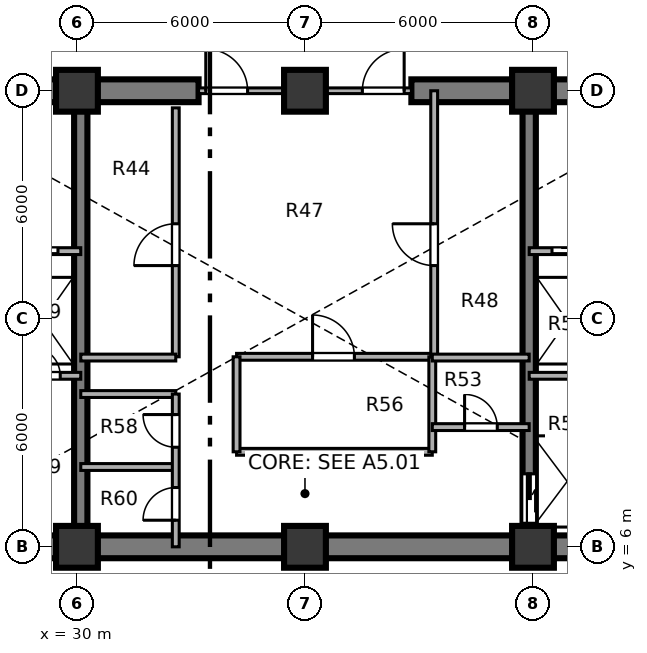
"""IFC4 building model, lengths in metres.
Left out: names, types, materials, properties, quantities, classifications, styles, units other than length and angle.
Written with IfcOpenShell. Run it as: python <this file> out.ifc"""

import sys

from ifc_helpers import new_model, si_unit, direction, frame, frame_2d, origin, origin_2d, place, context, subcontext, project, spatial, rectangle, extrude, source, transform, mapped, element, fill, save


model = new_model("IFC4")
c1 = context("Model", 3, precision=1e-05, world=origin(), true_north=direction((0.0, 1.0)))
c2 = subcontext(c1, "Body", "Model", "MODEL_VIEW")
j1 = project(units=[si_unit("LENGTHUNIT", "METRE"), si_unit("PLANEANGLEUNIT", "RADIAN")], contexts=[c1])
p1 = place(None, origin())
s1 = spatial("IfcSite", under=j1, at=p1, CompositionType="ELEMENT")
p2 = place(p1, origin())
s2 = spatial("IfcBuilding", under=s1, at=p2, CompositionType="ELEMENT")
p3 = place(p2, frame((0.0, 0.0, -4.86)))
s3 = spatial("IfcBuildingStorey", under=s2, at=p3, CompositionType="ELEMENT", Elevation=-4.86)
m1 = source(origin(), c2, "Body", "SweptSolid", [
    extrude(rectangle(XDim=1.1, YDim=1.1, at=origin_2d()), origin(), (0.0, 0.0, 1.0), 4.86),
])
for number, where, z_axis, x_axis in (
    (1, (30.0, 6.0, 0.0), (0.0, 0.0, 1.0), (1.0, 0.0, 0.0)),
    (2, (36.0, 6.0, 0.0), (0.0, 0.0, 1.0), (1.0, 0.0, 0.0)),
    (3, (42.0, 6.0, 0.0), (0.0, 0.0, 1.0), (1.0, 0.0, 0.0)),
    (4, (30.0, 18.0, 0.0), (0.0, 0.0, 1.0), (1.0, 0.0, 0.0)),
    (5, (36.0, 18.0, 0.0), (0.0, 0.0, 1.0), (1.0, 0.0, 0.0)),
    (6, (42.0, 18.0, 0.0), (0.0, 0.0, 1.0), (1.0, 0.0, 0.0)),
):
    element("IfcColumn", number, at=place(p3, frame(where, z_axis=z_axis, x_axis=x_axis)), inside=s3, PredefinedType="COLUMN", context=c2, shape_type="MappedRepresentation", body=[
        mapped(m1, transform((0.0, 0.0, 0.0), x_axis=(1.0, 0.0, 0.0), y_axis=(0.0, 1.0, 0.0), z_axis=(0.0, 0.0, 1.0), scale=1.0)),
    ])
p4 = place(p3, frame((48.3, 6.0, 0.0), z_axis=(0.0, 0.0, 1.0), x_axis=(-1.0, 0.0, 0.0)))
e7 = element("IfcWall", 7, at=p4, inside=s3, PredefinedType="SHEAR", context=c2, shape_type="SweptSolid", body=[
    extrude(rectangle(XDim=24.6, YDim=0.6, at=frame_2d((12.3, 0.0))), origin(), (0.0, 0.0, 1.0), 4.86),
])
p5 = place(p3, frame((23.7, 18.0, 0.0), z_axis=(0.0, 0.0, 1.0), x_axis=(1.0, 0.0, 0.0)))
e8 = element("IfcWall", 8, at=p5, inside=s3, PredefinedType="SHEAR", context=c2, shape_type="SweptSolid", body=[
    extrude(rectangle(XDim=9.5, YDim=0.6, at=frame_2d((4.75, 0.0))), origin(), (0.0, 0.0, 1.0), 4.86),
])
p6 = place(p5, frame((2.95, 0.0, 0.0)))
e9 = element("IfcOpeningElement", 9, at=p6, cuts=e8, PredefinedType="OPENING", context=c2, shape_type="SweptSolid", body=[
    extrude(rectangle(XDim=1.1, YDim=2.1, at=origin_2d()), frame((0.55, 0.31, 1.05), z_axis=(0.0, -1.0, 0.0), x_axis=(1.0, 0.0, 0.0)), (0.0, 0.0, 1.0), 0.62),
])
p7 = place(p3, frame((38.8, 18.0, 0.0), z_axis=(0.0, 0.0, 1.0), x_axis=(1.0, 0.0, 0.0)))
e10 = element("IfcWall", 10, at=p7, inside=s3, PredefinedType="SHEAR", context=c2, shape_type="SweptSolid", body=[
    extrude(rectangle(XDim=9.5, YDim=0.6, at=frame_2d((4.75, 0.0))), origin(), (0.0, 0.0, 1.0), 4.86),
])
p8 = place(p7, frame((5.45, 0.0, 0.0)))
e11 = element("IfcOpeningElement", 11, at=p8, cuts=e10, PredefinedType="OPENING", context=c2, shape_type="SweptSolid", body=[
    extrude(rectangle(XDim=1.1, YDim=2.1, at=origin_2d()), frame((0.55, 0.31, 1.05), z_axis=(0.0, -1.0, 0.0), x_axis=(1.0, 0.0, 0.0)), (0.0, 0.0, 1.0), 0.62),
])
p9 = place(p3, frame((30.1, 6.0, 0.0), z_axis=(0.0, 0.0, 1.0), x_axis=(0.0, 1.0, 0.0)))
e12 = element("IfcWall", 12, at=p9, inside=s3, PredefinedType="SHEAR", context=c2, shape_type="SweptSolid", body=[
    extrude(rectangle(XDim=12.0, YDim=0.35, at=frame_2d((6.0, 0.0))), origin(), (0.0, 0.0, 1.0), 4.86),
])
p10 = place(p3, frame((41.9, 18.0, 0.0), z_axis=(0.0, 0.0, 1.0), x_axis=(0.0, -1.0, 0.0)))
e13 = element("IfcWall", 13, at=p10, inside=s3, PredefinedType="SHEAR", context=c2, shape_type="SweptSolid", body=[
    extrude(rectangle(XDim=12.0, YDim=0.35, at=frame_2d((6.0, 0.0))), origin(), (0.0, 0.0, 1.0), 4.86),
])
p11 = place(p10, frame((10.08, 0.0, 0.0)))
e14 = element("IfcOpeningElement", 14, at=p11, cuts=e13, PredefinedType="OPENING", context=c2, shape_type="SweptSolid", body=[
    extrude(rectangle(XDim=1.3, YDim=2.1, at=origin_2d()), frame((0.65, 0.185, 1.05), z_axis=(0.0, -1.0, 0.0), x_axis=(1.0, 0.0, 0.0)), (0.0, 0.0, 1.0), 0.37),
])
p12 = place(p3, frame((32.6, 11.0, 0.0), z_axis=(0.0, 0.0, 1.0), x_axis=(0.0, 1.0, 0.0)))
e15 = element("IfcWall", 15, at=p12, inside=s3, PredefinedType="PARTITIONING", context=c2, shape_type="SweptSolid", body=[
    extrude(rectangle(XDim=6.55, YDim=0.18, at=frame_2d((3.275, 0.0))), origin(), (0.0, 0.0, 1.0), 4.51),
])
p13 = place(p12, frame((2.4, 0.0, 0.0)))
e16 = element("IfcOpeningElement", 16, at=p13, cuts=e15, PredefinedType="OPENING", context=c2, shape_type="SweptSolid", body=[
    extrude(rectangle(XDim=1.1, YDim=2.1, at=origin_2d()), frame((0.55, 0.1, 1.05), z_axis=(0.0, -1.0, 0.0), x_axis=(1.0, 0.0, 0.0)), (0.0, 0.0, 1.0), 0.2),
])
p14 = place(p3, frame((34.2, 11.0, 0.0), z_axis=(0.0, 0.0, 1.0), x_axis=(1.0, 0.0, 0.0)))
e17 = element("IfcWall", 17, at=p14, inside=s3, PredefinedType="PARTITIONING", context=c2, shape_type="SweptSolid", body=[
    extrude(rectangle(XDim=5.15, YDim=0.18, at=frame_2d((2.575, 0.0))), origin(), (0.0, 0.0, 1.0), 4.51),
])
p15 = place(p14, frame((2.0, 0.0, 0.0)))
e18 = element("IfcOpeningElement", 18, at=p15, cuts=e17, PredefinedType="OPENING", context=c2, shape_type="SweptSolid", body=[
    extrude(rectangle(XDim=1.1, YDim=2.1, at=origin_2d()), frame((0.55, 0.1, 1.05), z_axis=(0.0, -1.0, 0.0), x_axis=(1.0, 0.0, 0.0)), (0.0, 0.0, 1.0), 0.2),
])
p16 = place(p3, frame((34.2, 8.5, 0.0), z_axis=(0.0, 0.0, 1.0), x_axis=(1.0, 0.0, 0.0)))
e19 = element("IfcWall", 19, at=p16, inside=s3, PredefinedType="PARTITIONING", context=c2, shape_type="SweptSolid", body=[
    extrude(rectangle(XDim=5.15, YDim=0.18, at=frame_2d((2.575, 0.0))), origin(), (0.0, 0.0, 1.0), 4.51),
])
for number, where, z_axis, x_axis in (
    (20, (34.2, 8.5, 0.0), (0.0, 0.0, 1.0), (0.0, 1.0, 0.0)),
    (21, (39.35, 8.5, 0.0), (0.0, 0.0, 1.0), (0.0, 1.0, 0.0)),
):
    element("IfcWall", number, at=place(p3, frame(where, z_axis=z_axis, x_axis=x_axis)), inside=s3, PredefinedType="PARTITIONING", context=c2, shape_type="SweptSolid", body=[
        extrude(rectangle(XDim=2.5, YDim=0.18, at=frame_2d((1.25, 0.0))), origin(), (0.0, 0.0, 1.0), 4.51),
    ])
p17 = place(p3, frame((39.4, 11.0, 0.0), z_axis=(0.0, 0.0, 1.0), x_axis=(0.0, 1.0, 0.0)))
e22 = element("IfcWall", 22, at=p17, inside=s3, PredefinedType="PARTITIONING", context=c2, shape_type="SweptSolid", body=[
    extrude(rectangle(XDim=7.0, YDim=0.18, at=frame_2d((3.5, 0.0))), origin(), (0.0, 0.0, 1.0), 4.51),
])
p18 = place(p17, frame((2.4, 0.0, 0.0)))
e23 = element("IfcOpeningElement", 23, at=p18, cuts=e22, PredefinedType="OPENING", context=c2, shape_type="SweptSolid", body=[
    extrude(rectangle(XDim=1.1, YDim=2.1, at=origin_2d()), frame((0.55, 0.1, 1.05), z_axis=(0.0, -1.0, 0.0), x_axis=(1.0, 0.0, 0.0)), (0.0, 0.0, 1.0), 0.2),
])
p19 = place(p3, frame((30.1, 10.98, 0.0), z_axis=(0.0, 0.0, 1.0), x_axis=(1.0, 0.0, 0.0)))
e24 = element("IfcWall", 24, at=p19, inside=s3, PredefinedType="PARTITIONING", context=c2, shape_type="SweptSolid", body=[
    extrude(rectangle(XDim=2.5, YDim=0.18, at=frame_2d((1.25, 0.0))), origin(), (0.0, 0.0, 1.0), 4.51),
])
p20 = place(p3, frame((39.35, 10.98, 0.0), z_axis=(0.0, 0.0, 1.0), x_axis=(1.0, 0.0, 0.0)))
e25 = element("IfcWall", 25, at=p20, inside=s3, PredefinedType="PARTITIONING", context=c2, shape_type="SweptSolid", body=[
    extrude(rectangle(XDim=2.55, YDim=0.18, at=frame_2d((1.275, 0.0))), origin(), (0.0, 0.0, 1.0), 4.51),
])
for number, where, z_axis, x_axis in (
    (26, (30.1, 8.1, 0.0), (0.0, 0.0, 1.0), (1.0, 0.0, 0.0)),
    (27, (30.1, 10.02, 0.0), (0.0, 0.0, 1.0), (1.0, 0.0, 0.0)),
):
    element("IfcWall", number, at=place(p3, frame(where, z_axis=z_axis, x_axis=x_axis)), inside=s3, PredefinedType="PARTITIONING", context=c2, shape_type="SweptSolid", body=[
        extrude(rectangle(XDim=2.5, YDim=0.18, at=frame_2d((1.25, 0.0))), origin(), (0.0, 0.0, 1.0), 4.51),
    ])
p21 = place(p3, frame((32.6, 6.0, 0.0), z_axis=(0.0, 0.0, 1.0), x_axis=(0.0, 1.0, 0.0)))
e28 = element("IfcWall", 28, at=p21, inside=s3, PredefinedType="PARTITIONING", context=c2, shape_type="SweptSolid", body=[
    extrude(rectangle(XDim=4.02, YDim=0.18, at=frame_2d((2.01, 0.0))), origin(), (0.0, 0.0, 1.0), 4.51),
])
p22 = place(p21, frame((0.7, 0.0, 0.0)))
e29 = element("IfcOpeningElement", 29, at=p22, cuts=e28, PredefinedType="OPENING", context=c2, shape_type="SweptSolid", body=[
    extrude(rectangle(XDim=0.86, YDim=2.1, at=origin_2d()), frame((0.43, 0.1, 1.05), z_axis=(0.0, -1.0, 0.0), x_axis=(1.0, 0.0, 0.0)), (0.0, 0.0, 1.0), 0.2),
])
p23 = place(p21, frame((2.62, 0.0, 0.0)))
e30 = element("IfcOpeningElement", 30, at=p23, cuts=e28, PredefinedType="OPENING", context=c2, shape_type="SweptSolid", body=[
    extrude(rectangle(XDim=0.86, YDim=2.1, at=origin_2d()), frame((0.43, 0.1, 1.05), z_axis=(0.0, -1.0, 0.0), x_axis=(1.0, 0.0, 0.0)), (0.0, 0.0, 1.0), 0.2),
])
p24 = place(p3, frame((39.35, 9.15, 0.0), z_axis=(0.0, 0.0, 1.0), x_axis=(1.0, 0.0, 0.0)))
e31 = element("IfcWall", 31, at=p24, inside=s3, PredefinedType="PARTITIONING", context=c2, shape_type="SweptSolid", body=[
    extrude(rectangle(XDim=2.55, YDim=0.18, at=frame_2d((1.275, 0.0))), origin(), (0.0, 0.0, 1.0), 4.51),
])
p25 = place(p24, frame((0.85, 0.0, 0.0)))
e32 = element("IfcOpeningElement", 32, at=p25, cuts=e31, PredefinedType="OPENING", context=c2, shape_type="SweptSolid", body=[
    extrude(rectangle(XDim=0.86, YDim=2.1, at=origin_2d()), frame((0.43, 0.1, 1.05), z_axis=(0.0, -1.0, 0.0), x_axis=(1.0, 0.0, 0.0)), (0.0, 0.0, 1.0), 0.2),
])
p26 = place(p3, frame((33.2, 18.0, 0.0), z_axis=(0.0, 0.0, 1.0), x_axis=(1.0, 0.0, 0.0)))
e33 = element("IfcWall", 33, at=p26, inside=s3, PredefinedType="PARTITIONING", context=c2, shape_type="SweptSolid", body=[
    extrude(rectangle(XDim=5.6, YDim=0.15, at=frame_2d((2.8, 0.0))), origin(), (0.0, 0.0, 1.0), 3.325),
])
p27 = place(p26, frame((0.19, 0.0, 0.0)))
e34 = element("IfcOpeningElement", 34, at=p27, cuts=e33, PredefinedType="OPENING", context=c2, shape_type="SweptSolid", body=[
    extrude(rectangle(XDim=1.1, YDim=2.1, at=origin_2d()), frame((0.55, 0.085, 1.05), z_axis=(0.0, -1.0, 0.0), x_axis=(1.0, 0.0, 0.0)), (0.0, 0.0, 1.0), 0.17),
])
p28 = place(p26, frame((4.31, 0.0, 0.0)))
e35 = element("IfcOpeningElement", 35, at=p28, cuts=e33, PredefinedType="OPENING", context=c2, shape_type="SweptSolid", body=[
    extrude(rectangle(XDim=1.1, YDim=2.1, at=origin_2d()), frame((0.55, 0.085, 1.05), z_axis=(0.0, -1.0, 0.0), x_axis=(1.0, 0.0, 0.0)), (0.0, 0.0, 1.0), 0.17),
])
p29 = place(p3, frame((24.0, 13.78, 0.0), z_axis=(0.0, 0.0, 1.0), x_axis=(1.0, 0.0, 0.0)))
e36 = element("IfcWall", 36, at=p29, inside=s3, PredefinedType="PARTITIONING", context=c2, shape_type="SweptSolid", body=[
    extrude(rectangle(XDim=6.1, YDim=0.18, at=frame_2d((3.05, 0.0))), origin(), (0.0, 0.0, 1.0), 4.51),
])
p30 = place(p29, frame((1.15, 0.0, 0.0)))
e37 = element("IfcOpeningElement", 37, at=p30, cuts=e36, PredefinedType="OPENING", context=c2, shape_type="SweptSolid", body=[
    extrude(rectangle(XDim=1.1, YDim=2.1, at=origin_2d()), frame((0.55, 0.1, 1.05), z_axis=(0.0, -1.0, 0.0), x_axis=(1.0, 0.0, 0.0)), (0.0, 0.0, 1.0), 0.2),
])
p31 = place(p29, frame((4.4, 0.0, 0.0)))
e38 = element("IfcOpeningElement", 38, at=p31, cuts=e36, PredefinedType="OPENING", context=c2, shape_type="SweptSolid", body=[
    extrude(rectangle(XDim=1.1, YDim=2.1, at=origin_2d()), frame((0.55, 0.1, 1.05), z_axis=(0.0, -1.0, 0.0), x_axis=(1.0, 0.0, 0.0)), (0.0, 0.0, 1.0), 0.2),
])
p32 = place(p3, frame((28.15, 10.5, 0.0), z_axis=(0.0, 0.0, 1.0), x_axis=(1.0, 0.0, 0.0)))
e39 = element("IfcWall", 39, at=p32, inside=s3, PredefinedType="PARTITIONING", context=c2, shape_type="SweptSolid", body=[
    extrude(rectangle(XDim=1.95, YDim=0.18, at=frame_2d((0.975, 0.0))), origin(), (0.0, 0.0, 1.0), 4.51),
])
p33 = place(p32, frame((0.65, 0.0, 0.0)))
e40 = element("IfcOpeningElement", 40, at=p33, cuts=e39, PredefinedType="OPENING", context=c2, shape_type="SweptSolid", body=[
    extrude(rectangle(XDim=0.76, YDim=2.05, at=origin_2d()), frame((0.38, 0.1, 1.025), z_axis=(0.0, -1.0, 0.0), x_axis=(1.0, 0.0, 0.0)), (0.0, 0.0, 1.0), 0.2),
])
p34 = place(p3, frame((41.9, 13.78, 0.0), z_axis=(0.0, 0.0, 1.0), x_axis=(1.0, 0.0, 0.0)))
e41 = element("IfcWall", 41, at=p34, inside=s3, PredefinedType="PARTITIONING", context=c2, shape_type="SweptSolid", body=[
    extrude(rectangle(XDim=6.1, YDim=0.18, at=frame_2d((3.05, 0.0))), origin(), (0.0, 0.0, 1.0), 4.51),
])
p35 = place(p34, frame((0.6, 0.0, 0.0)))
e42 = element("IfcOpeningElement", 42, at=p35, cuts=e41, PredefinedType="OPENING", context=c2, shape_type="SweptSolid", body=[
    extrude(rectangle(XDim=1.1, YDim=2.1, at=origin_2d()), frame((0.55, 0.1, 1.05), z_axis=(0.0, -1.0, 0.0), x_axis=(1.0, 0.0, 0.0)), (0.0, 0.0, 1.0), 0.2),
])
p36 = place(p34, frame((3.8, 0.0, 0.0)))
e43 = element("IfcOpeningElement", 43, at=p36, cuts=e41, PredefinedType="OPENING", context=c2, shape_type="SweptSolid", body=[
    extrude(rectangle(XDim=1.1, YDim=2.1, at=origin_2d()), frame((0.55, 0.1, 1.05), z_axis=(0.0, -1.0, 0.0), x_axis=(1.0, 0.0, 0.0)), (0.0, 0.0, 1.0), 0.2),
])
p37 = place(p3, frame((41.9, 10.5, 0.0), z_axis=(0.0, 0.0, 1.0), x_axis=(1.0, 0.0, 0.0)))
e44 = element("IfcWall", 44, at=p37, inside=s3, PredefinedType="PARTITIONING", context=c2, shape_type="SweptSolid", body=[
    extrude(rectangle(XDim=1.95, YDim=0.18, at=frame_2d((0.975, 0.0))), origin(), (0.0, 0.0, 1.0), 4.51),
])
m2 = source(origin(), c2, "Body", "SweptSolid", [
    extrude(rectangle(XDim=1.1, YDim=2.1, at=origin_2d()), frame((0.55, 0.025, 1.05), z_axis=(0.0, -1.0, 0.0), x_axis=(1.0, 0.0, 0.0)), (0.0, 0.0, 1.0), 0.05),
])
p38 = place(p13, origin())
e45 = element("IfcDoor", 45, at=p38, inside=s3, OperationType="SINGLE_SWING_LEFT", PredefinedType="DOOR", context=c2, shape_type="MappedRepresentation", body=[
    mapped(m2, transform((0.0, 0.0, 0.0), x_axis=(1.0, 0.0, 0.0), y_axis=(0.0, 1.0, 0.0), z_axis=(0.0, 0.0, 1.0), scale=1.0)),
])
fill(e16, e45)
p39 = place(p15, origin())
e46 = element("IfcDoor", 46, at=p39, inside=s3, OperationType="SINGLE_SWING_LEFT", PredefinedType="DOOR", context=c2, shape_type="MappedRepresentation", body=[
    mapped(m2, transform((0.0, 0.0, 0.0), x_axis=(1.0, 0.0, 0.0), y_axis=(0.0, 1.0, 0.0), z_axis=(0.0, 0.0, 1.0), scale=1.0)),
])
fill(e18, e46)
p40 = place(p18, origin())
e47 = element("IfcDoor", 47, at=p40, inside=s3, OperationType="SINGLE_SWING_RIGHT", PredefinedType="DOOR", context=c2, shape_type="MappedRepresentation", body=[
    mapped(m2, transform((0.0, 0.0, 0.0), x_axis=(1.0, 0.0, 0.0), y_axis=(0.0, 1.0, 0.0), z_axis=(0.0, 0.0, 1.0), scale=1.0)),
])
fill(e23, e47)
m3 = source(origin(), c2, "Body", "SweptSolid", [
    extrude(rectangle(XDim=0.86, YDim=2.1, at=origin_2d()), frame((0.43, 0.025, 1.05), z_axis=(0.0, -1.0, 0.0), x_axis=(1.0, 0.0, 0.0)), (0.0, 0.0, 1.0), 0.05),
])
p41 = place(p22, origin())
e48 = element("IfcDoor", 48, at=p41, inside=s3, OperationType="SINGLE_SWING_LEFT", PredefinedType="DOOR", context=c2, shape_type="MappedRepresentation", body=[
    mapped(m3, transform((0.0, 0.0, 0.0), x_axis=(1.0, 0.0, 0.0), y_axis=(0.0, 1.0, 0.0), z_axis=(0.0, 0.0, 1.0), scale=1.0)),
])
fill(e29, e48)
p42 = place(p23, origin())
e49 = element("IfcDoor", 49, at=p42, inside=s3, OperationType="SINGLE_SWING_RIGHT", PredefinedType="DOOR", context=c2, shape_type="MappedRepresentation", body=[
    mapped(m3, transform((0.0, 0.0, 0.0), x_axis=(1.0, 0.0, 0.0), y_axis=(0.0, 1.0, 0.0), z_axis=(0.0, 0.0, 1.0), scale=1.0)),
])
fill(e30, e49)
p43 = place(p25, origin())
e50 = element("IfcDoor", 50, at=p43, inside=s3, OperationType="SINGLE_SWING_LEFT", PredefinedType="DOOR", context=c2, shape_type="MappedRepresentation", body=[
    mapped(m3, transform((0.0, 0.0, 0.0), x_axis=(1.0, 0.0, 0.0), y_axis=(0.0, 1.0, 0.0), z_axis=(0.0, 0.0, 1.0), scale=1.0)),
])
fill(e32, e50)
m4 = source(origin(), c2, "Body", "SweptSolid", [
    extrude(rectangle(XDim=1.1, YDim=2.1, at=origin_2d()), frame((0.55, 0.025, 1.05), z_axis=(0.0, -1.0, 0.0), x_axis=(1.0, 0.0, 0.0)), (0.0, 0.0, 1.0), 0.05),
])
p44 = place(p27, origin())
e51 = element("IfcDoor", 51, at=p44, inside=s3, OperationType="SINGLE_SWING_LEFT", PredefinedType="DOOR", context=c2, shape_type="MappedRepresentation", body=[
    mapped(m4, transform((0.0, 0.0, 0.0), x_axis=(1.0, 0.0, 0.0), y_axis=(0.0, 1.0, 0.0), z_axis=(0.0, 0.0, 1.0), scale=1.0)),
])
fill(e34, e51)
p45 = place(p28, origin())
e52 = element("IfcDoor", 52, at=p45, inside=s3, OperationType="SINGLE_SWING_RIGHT", PredefinedType="DOOR", context=c2, shape_type="MappedRepresentation", body=[
    mapped(m4, transform((0.0, 0.0, 0.0), x_axis=(1.0, 0.0, 0.0), y_axis=(0.0, 1.0, 0.0), z_axis=(0.0, 0.0, 1.0), scale=1.0)),
])
fill(e35, e52)
m5 = source(origin(), c2, "Body", "SweptSolid", [
    extrude(rectangle(XDim=1.1, YDim=2.1, at=origin_2d()), frame((0.55, 0.025, 1.05), z_axis=(0.0, -1.0, 0.0), x_axis=(1.0, 0.0, 0.0)), (0.0, 0.0, 1.0), 0.05),
])
p46 = place(p31, origin())
e53 = element("IfcDoor", 53, at=p46, inside=s3, OperationType="SLIDING_TO_LEFT", PredefinedType="DOOR", context=c2, shape_type="MappedRepresentation", body=[
    mapped(m5, transform((0.0, 0.0, 0.0), x_axis=(1.0, 0.0, 0.0), y_axis=(0.0, 1.0, 0.0), z_axis=(0.0, 0.0, 1.0), scale=1.0)),
])
fill(e38, e53)
m6 = source(origin(), c2, "Body", "SweptSolid", [
    extrude(rectangle(XDim=0.76, YDim=2.05, at=origin_2d()), frame((0.38, 0.025, 1.025), z_axis=(0.0, -1.0, 0.0), x_axis=(1.0, 0.0, 0.0)), (0.0, 0.0, 1.0), 0.05),
])
p47 = place(p33, origin())
e54 = element("IfcDoor", 54, at=p47, inside=s3, OperationType="SINGLE_SWING_LEFT", PredefinedType="DOOR", context=c2, shape_type="MappedRepresentation", body=[
    mapped(m6, transform((0.0, 0.0, 0.0), x_axis=(1.0, 0.0, 0.0), y_axis=(0.0, 1.0, 0.0), z_axis=(0.0, 0.0, 1.0), scale=1.0)),
])
fill(e40, e54)
p48 = place(p35, origin())
e55 = element("IfcDoor", 55, at=p48, inside=s3, OperationType="SLIDING_TO_RIGHT", PredefinedType="DOOR", context=c2, shape_type="MappedRepresentation", body=[
    mapped(m5, transform((0.0, 0.0, 0.0), x_axis=(1.0, 0.0, 0.0), y_axis=(0.0, 1.0, 0.0), z_axis=(0.0, 0.0, 1.0), scale=1.0)),
])
fill(e42, e55)
m7 = source(origin(), c2, "Body", "SweptSolid", [
    extrude(rectangle(XDim=1.3, YDim=2.1, at=origin_2d()), frame((0.65, 0.025, 1.05), z_axis=(0.0, -1.0, 0.0), x_axis=(1.0, 0.0, 0.0)), (0.0, 0.0, 1.0), 0.05),
])
p49 = place(p11, origin())
e56 = element("IfcDoor", 56, at=p49, inside=s3, OperationType="SLIDING_TO_LEFT", PredefinedType="DOOR", context=c2, shape_type="MappedRepresentation", body=[
    mapped(m7, transform((0.0, 0.0, 0.0), x_axis=(1.0, 0.0, 0.0), y_axis=(0.0, 1.0, 0.0), z_axis=(0.0, 0.0, 1.0), scale=1.0)),
])
fill(e14, e56)
save(model, sys.argv[1])
